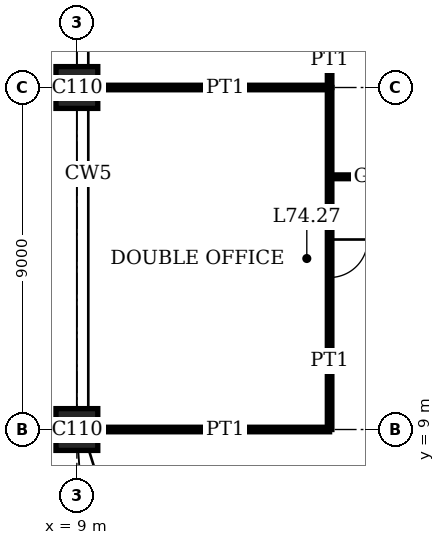
"""IFC4 building model, lengths in metres.
Left out: names, types, materials, properties, quantities, classifications, styles, units other than length and angle.
Written with IfcOpenShell. Run it as: python <this file> out.ifc"""

import sys

from ifc_helpers import new_model, si_unit, direction, frame, frame_2d, origin, origin_2d, place, context, subcontext, project, spatial, rectangle, extrude, element, fill, save


model = new_model("IFC4")
c1 = context("Model", 3, precision=1e-05, world=origin(), true_north=direction((0.0, 1.0)))
c2 = subcontext(c1, "Body", "Model", "MODEL_VIEW")
j1 = project(units=[si_unit("LENGTHUNIT", "METRE"), si_unit("PLANEANGLEUNIT", "RADIAN")], contexts=[c1])
p1 = place(None, origin())
s1 = spatial("IfcSite", under=j1, at=p1, CompositionType="ELEMENT")
p2 = place(p1, origin())
s2 = spatial("IfcBuilding", under=s1, at=p2, CompositionType="ELEMENT")
p3 = place(p2, frame((0.0, 0.0, 303.4)))
s3 = spatial("IfcBuildingStorey", under=s2, at=p3, CompositionType="ELEMENT", Elevation=303.4)
for number, where, z_axis, x_axis in (
    (1, (9.0, 9.0, 0.0), (0.0, 0.0, 1.0), (1.0, 0.0, 0.0)),
    (2, (9.0, 18.0, 0.0), (0.0, 0.0, 1.0), (1.0, 0.0, 0.0)),
):
    element("IfcColumn", number, at=place(p3, frame(where, z_axis=z_axis, x_axis=x_axis)), inside=s3, PredefinedType="COLUMN", context=c2, shape_type="SweptSolid", body=[
        extrude(rectangle(XDim=1.1, YDim=1.1, at=origin_2d()), origin(), (0.0, 0.0, 1.0), 4.0),
    ])
p4 = place(p3, frame((9.55, 9.0, 0.0), z_axis=(0.0, 0.0, 1.0), x_axis=(1.0, 0.0, 0.0)))
e3 = element("IfcWall", 3, at=p4, inside=s3, PredefinedType="PARTITIONING", context=c2, shape_type="SweptSolid", body=[
    extrude(rectangle(XDim=6.1, YDim=0.12, at=frame_2d((3.05, 0.0))), origin(), (0.0, 0.0, 1.0), 3.05),
])
p5 = place(p3, frame((15.66, 15.65, 0.0), z_axis=(0.0, 0.0, 1.0), x_axis=(1.0, 0.0, 0.0)))
e4 = element("IfcWall", 4, at=p5, inside=s3, PredefinedType="PARTITIONING", context=c2, shape_type="SweptSolid", body=[
    extrude(rectangle(XDim=2.33, YDim=0.1, at=frame_2d((1.165, 0.0))), origin(), (0.0, 0.0, 1.0), 3.75),
])
p6 = place(p3, frame((9.55, 18.0, 0.0), z_axis=(0.0, 0.0, 1.0), x_axis=(1.0, 0.0, 0.0)))
e5 = element("IfcWall", 5, at=p6, inside=s3, PredefinedType="PARTITIONING", context=c2, shape_type="SweptSolid", body=[
    extrude(rectangle(XDim=6.1, YDim=0.12, at=frame_2d((3.05, 0.0))), origin(), (0.0, 0.0, 1.0), 3.05),
])
p7 = place(p3, frame((15.65, 9.0, 0.0), z_axis=(0.0, 0.0, 1.0), x_axis=(0.0, 1.0, 0.0)))
e6 = element("IfcWall", 6, at=p7, inside=s3, PredefinedType="PARTITIONING", context=c2, shape_type="SweptSolid", body=[
    extrude(rectangle(XDim=9.0, YDim=0.12, at=frame_2d((4.5, 0.0))), origin(), (0.0, 0.0, 1.0), 3.75),
])
p8 = place(p7, frame((4.0, 0.0, 0.0)))
e7 = element("IfcOpeningElement", 7, at=p8, cuts=e6, PredefinedType="OPENING", context=c2, shape_type="SweptSolid", body=[
    extrude(rectangle(XDim=1.0, YDim=2.4, at=frame_2d((0.5, 1.2))), frame((0.0, 0.07, 0.0), z_axis=(0.0, -1.0, 0.0), x_axis=(1.0, 0.0, 0.0)), (0.0, 0.0, 1.0), 0.14),
])
p9 = place(p3, frame((15.65, 18.0, 0.0), z_axis=(0.0, 0.0, 1.0), x_axis=(0.0, 1.0, 0.0)))
e8 = element("IfcWall", 8, at=p9, inside=s3, PredefinedType="PARTITIONING", context=c2, shape_type="SweptSolid", body=[
    extrude(rectangle(XDim=4.5, YDim=0.12, at=frame_2d((2.25, 0.0))), origin(), (0.0, 0.0, 1.0), 3.75),
])
p10 = place(p9, frame((1.75, 0.0, 0.0)))
e9 = element("IfcOpeningElement", 9, at=p10, cuts=e8, PredefinedType="OPENING", context=c2, shape_type="SweptSolid", body=[
    extrude(rectangle(XDim=1.0, YDim=2.4, at=frame_2d((0.5, 1.2))), frame((0.0, 0.07, 0.0), z_axis=(0.0, -1.0, 0.0), x_axis=(1.0, 0.0, 0.0)), (0.0, 0.0, 1.0), 0.14),
])
p11 = place(p8, origin())
e10 = element("IfcDoor", 10, at=p11, inside=s3, OperationType="SINGLE_SWING_RIGHT", PredefinedType="DOOR", context=c2, shape_type="SweptSolid", body=[
    extrude(rectangle(XDim=1.0, YDim=2.4, at=frame_2d((0.5, 1.2))), frame((0.0, 0.025, 0.0), z_axis=(0.0, -1.0, 0.0), x_axis=(1.0, 0.0, 0.0)), (0.0, 0.0, 1.0), 0.05),
])
fill(e7, e10)
save(model, sys.argv[1])
